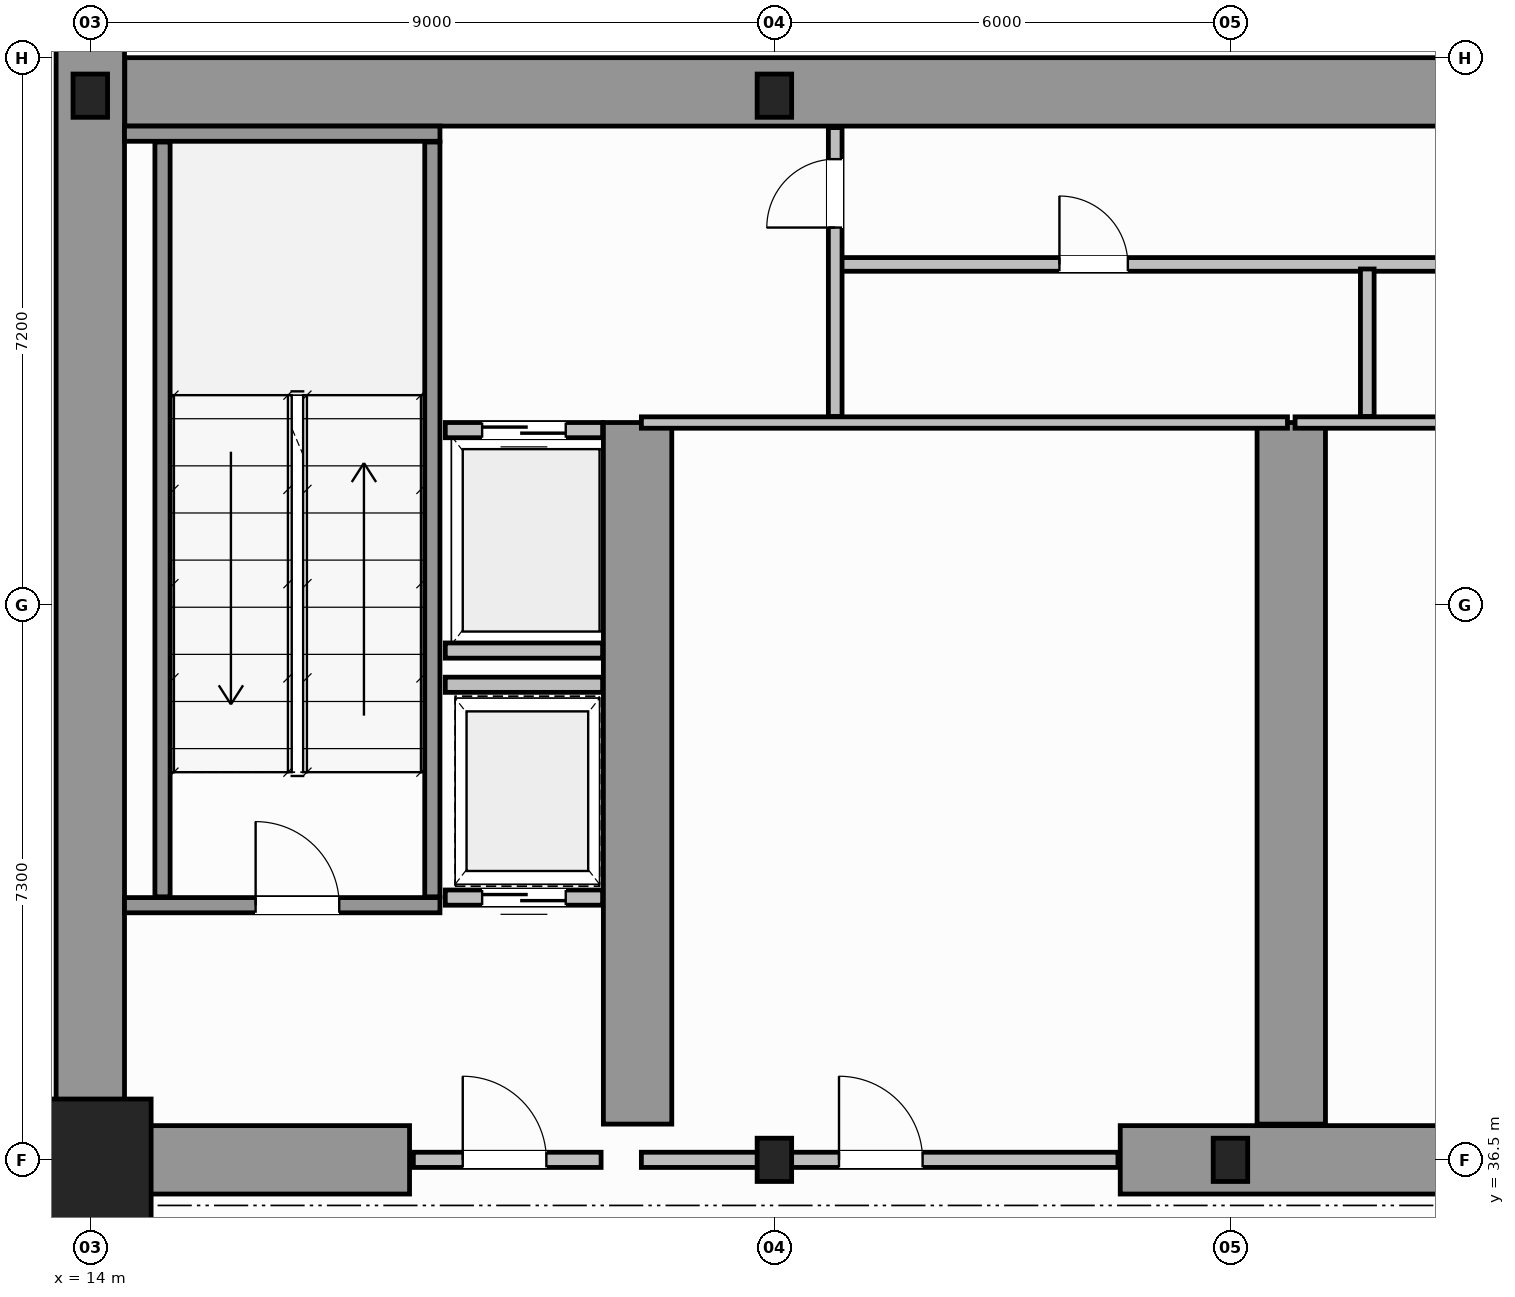
"""IFC4 building model, lengths in metres.
Left out: names, types, materials, properties, quantities, classifications, styles, units other than length and angle.
Written with IfcOpenShell. Run it as: python <this file> out.ifc"""

import sys

from ifc_helpers import new_model, si_unit, direction, frame, frame_2d, origin, origin_2d, place, context, subcontext, project, spatial, rectangle, i_section, extrude, source, transform, mapped, element, fill, save


model = new_model("IFC4")
c1 = context("Model", 3, precision=1e-05, world=origin(), true_north=direction((0.0, 1.0)))
c2 = subcontext(c1, "Body", "Model", "MODEL_VIEW")
j1 = project(units=[si_unit("LENGTHUNIT", "METRE"), si_unit("PLANEANGLEUNIT", "RADIAN")], contexts=[c1])
p1 = place(None, origin())
s1 = spatial("IfcSite", under=j1, at=p1, CompositionType="ELEMENT")
p2 = place(p1, origin())
s2 = spatial("IfcBuilding", under=s1, at=p2, CompositionType="ELEMENT")
p3 = place(p2, frame((0.0, 0.0, -5.2)))
s3 = spatial("IfcBuildingStorey", under=s2, at=p3, CompositionType="ELEMENT", Elevation=-5.2)
m1 = source(origin(), c2, "Body", "SweptSolid", [
    extrude(rectangle(XDim=1.6, YDim=1.6, at=origin_2d()), origin(), (0.0, 0.0, 1.0), 5.2),
])
p4 = place(p3, frame((14.0, 36.5, 0.0), z_axis=(0.0, 0.0, 1.0), x_axis=(1.0, 0.0, 0.0)))
e1 = element("IfcColumn", 1, at=p4, inside=s3, PredefinedType="COLUMN", context=c2, shape_type="MappedRepresentation", body=[
    mapped(m1, transform((0.0, 0.0, 0.0), scale=1.0)),
])
m2 = source(origin(), c2, "Body", "SweptSolid", [
    extrude(i_section(OverallWidth=0.454, OverallDepth=0.569, WebThickness=0.078, FlangeThickness=0.08, FilletRadius=0.015, at=origin_2d()), origin(), (0.0, 0.0, 1.0), 5.2),
])
for number, where, z_axis, x_axis in (
    (2, (23.0, 36.5, 0.0), (0.0, 0.0, 1.0), (1.0, 0.0, 0.0)),
    (3, (29.0, 36.5, 0.0), (0.0, 0.0, 1.0), (1.0, 0.0, 0.0)),
    (4, (14.0, 50.5, 0.0), (0.0, 0.0, 1.0), (1.0, 0.0, 0.0)),
    (5, (23.0, 50.5, 0.0), (0.0, 0.0, 1.0), (1.0, 0.0, 0.0)),
):
    element("IfcColumn", number, at=place(p3, frame(where, z_axis=z_axis, x_axis=x_axis)), inside=s3, PredefinedType="COLUMN", context=c2, shape_type="MappedRepresentation", body=[
        mapped(m2, transform((0.0, 0.0, 0.0), scale=1.0)),
    ])
p5 = place(p3, frame((14.454, 50.55, 0.0), z_axis=(0.0, 0.0, 1.0), x_axis=(1.0, 0.0, 0.0)))
e6 = element("IfcWall", 6, at=p5, inside=s3, PredefinedType="SHEAR", context=c2, shape_type="SweptSolid", body=[
    extrude(rectangle(XDim=19.544, YDim=0.9, at=frame_2d((9.772, 0.0))), origin(), (0.0, 0.0, 1.0), 5.2),
])
p6 = place(p3, frame((14.0, 36.5, 0.0), z_axis=(0.0, 0.0, 1.0), x_axis=(0.0, 1.0, 0.0)))
e7 = element("IfcWall", 7, at=p6, inside=s3, PredefinedType="SHEAR", context=c2, shape_type="SweptSolid", body=[
    extrude(rectangle(XDim=15.0, YDim=0.9, at=frame_2d((7.5, 0.0))), origin(), (0.0, 0.0, 1.0), 5.2),
])
p7 = place(p3, frame((14.47, 36.5, 0.0), z_axis=(0.0, 0.0, 1.0), x_axis=(1.0, 0.0, 0.0)))
e8 = element("IfcWall", 8, at=p7, inside=s3, PredefinedType="SHEAR", context=c2, shape_type="SweptSolid", body=[
    extrude(rectangle(XDim=3.73, YDim=0.9, at=frame_2d((1.865, 0.0))), origin(), (0.0, 0.0, 1.0), 3.68),
])
p8 = place(p3, frame((27.55, 36.5, 0.0), z_axis=(0.0, 0.0, 1.0), x_axis=(1.0, 0.0, 0.0)))
e9 = element("IfcWall", 9, at=p8, inside=s3, PredefinedType="SHEAR", context=c2, shape_type="SweptSolid", body=[
    extrude(rectangle(XDim=4.5, YDim=0.9, at=frame_2d((2.25, 0.0))), origin(), (0.0, 0.0, 1.0), 5.2),
])
for number, where, z_axis, x_axis in (
    (10, (21.2, 36.97, 0.0), (0.0, 0.0, 1.0), (0.0, 1.0, 0.0)),
    (11, (29.8, 36.97, 0.0), (0.0, 0.0, 1.0), (0.0, 1.0, 0.0)),
):
    element("IfcWall", number, at=place(p3, frame(where, z_axis=z_axis, x_axis=x_axis)), inside=s3, PredefinedType="SHEAR", context=c2, shape_type="SweptSolid", body=[
        extrude(rectangle(XDim=9.23, YDim=0.9, at=frame_2d((4.615, 0.0))), origin(), (0.0, 0.0, 1.0), 5.2),
    ])
p9 = place(p3, frame((14.45, 39.85, 0.0), z_axis=(0.0, 0.0, 1.0), x_axis=(1.0, 0.0, 0.0)))
e12 = element("IfcWall", 12, at=p9, inside=s3, PredefinedType="SOLIDWALL", context=c2, shape_type="SweptSolid", body=[
    extrude(rectangle(XDim=4.15, YDim=0.2, at=frame_2d((2.075, 0.0))), origin(), (0.0, 0.0, 1.0), 5.2),
])
p10 = place(p9, frame((1.725, 0.0, 0.0)))
e13 = element("IfcOpeningElement", 13, at=p10, cuts=e12, PredefinedType="OPENING", context=c2, shape_type="SweptSolid", body=[
    extrude(rectangle(XDim=1.1, YDim=2.15, at=frame_2d((0.55, 1.075))), frame((0.0, 0.11, 0.0), z_axis=(0.0, -1.0, 0.0), x_axis=(1.0, 0.0, 0.0)), (0.0, 0.0, 1.0), 0.22),
])
p11 = place(p3, frame((14.45, 50.0, 0.0), z_axis=(0.0, 0.0, 1.0), x_axis=(1.0, 0.0, 0.0)))
e14 = element("IfcWall", 14, at=p11, inside=s3, PredefinedType="SOLIDWALL", context=c2, shape_type="SweptSolid", body=[
    extrude(rectangle(XDim=4.15, YDim=0.2, at=frame_2d((2.075, 0.0))), origin(), (0.0, 0.0, 1.0), 5.2),
])
for number, where, z_axis, x_axis in (
    (15, (14.95, 39.96, 0.0), (0.0, 0.0, 1.0), (0.0, 1.0, 0.0)),
    (16, (18.5, 39.96, 0.0), (0.0, 0.0, 1.0), (0.0, 1.0, 0.0)),
):
    element("IfcWall", number, at=place(p3, frame(where, z_axis=z_axis, x_axis=x_axis)), inside=s3, PredefinedType="SOLIDWALL", context=c2, shape_type="SweptSolid", body=[
        extrude(rectangle(XDim=9.93, YDim=0.2, at=frame_2d((4.965, 0.0))), origin(), (0.0, 0.0, 1.0), 5.2),
    ])
p12 = place(p3, frame((18.25, 36.5, 0.0), z_axis=(0.0, 0.0, 1.0), x_axis=(1.0, 0.0, 0.0)))
e17 = element("IfcWall", 17, at=p12, inside=s3, PredefinedType="SOLIDWALL", context=c2, shape_type="SweptSolid", body=[
    extrude(rectangle(XDim=2.47, YDim=0.2, at=frame_2d((1.235, 0.0))), origin(), (0.0, 0.0, 1.0), 3.67),
])
p13 = place(p12, frame((0.65, 0.0, 0.0)))
e18 = element("IfcOpeningElement", 18, at=p13, cuts=e17, PredefinedType="OPENING", context=c2, shape_type="SweptSolid", body=[
    extrude(rectangle(XDim=1.1, YDim=2.15, at=frame_2d((0.55, 1.075))), frame((0.0, 0.11, 0.0), z_axis=(0.0, -1.0, 0.0), x_axis=(1.0, 0.0, 0.0)), (0.0, 0.0, 1.0), 0.22),
])
p14 = place(p3, frame((18.67, 46.1, 0.0), z_axis=(0.0, 0.0, 1.0), x_axis=(1.0, 0.0, 0.0)))
e19 = element("IfcWall", 19, at=p14, inside=s3, PredefinedType="SOLIDWALL", context=c2, shape_type="SweptSolid", body=[
    extrude(rectangle(XDim=2.07, YDim=0.2, at=frame_2d((1.035, 0.0))), origin(), (0.0, 0.0, 1.0), 4.88),
])
p15 = place(p14, frame((0.485, 0.0, 0.0)))
e20 = element("IfcOpeningElement", 20, at=p15, cuts=e19, PredefinedType="OPENING", context=c2, shape_type="SweptSolid", body=[
    extrude(rectangle(XDim=1.1, YDim=2.15, at=frame_2d((0.55, 1.075))), frame((0.0, 0.11, 0.0), z_axis=(0.0, -1.0, 0.0), x_axis=(1.0, 0.0, 0.0)), (0.0, 0.0, 1.0), 0.22),
])
p16 = place(p3, frame((18.67, 43.2, 0.0), z_axis=(0.0, 0.0, 1.0), x_axis=(1.0, 0.0, 0.0)))
e21 = element("IfcWall", 21, at=p16, inside=s3, PredefinedType="SOLIDWALL", context=c2, shape_type="SweptSolid", body=[
    extrude(rectangle(XDim=2.07, YDim=0.2, at=frame_2d((1.035, 0.0))), origin(), (0.0, 0.0, 1.0), 4.88),
])
p17 = place(p3, frame((18.67, 39.95, 0.0), z_axis=(0.0, 0.0, 1.0), x_axis=(1.0, 0.0, 0.0)))
e22 = element("IfcWall", 22, at=p17, inside=s3, PredefinedType="SOLIDWALL", context=c2, shape_type="SweptSolid", body=[
    extrude(rectangle(XDim=2.07, YDim=0.2, at=frame_2d((1.035, 0.0))), origin(), (0.0, 0.0, 1.0), 4.88),
])
p18 = place(p17, frame((0.485, 0.0, 0.0)))
e23 = element("IfcOpeningElement", 23, at=p18, cuts=e22, PredefinedType="OPENING", context=c2, shape_type="SweptSolid", body=[
    extrude(rectangle(XDim=1.1, YDim=2.15, at=frame_2d((0.55, 1.075))), frame((0.0, 0.11, 0.0), z_axis=(0.0, -1.0, 0.0), x_axis=(1.0, 0.0, 0.0)), (0.0, 0.0, 1.0), 0.22),
])
p19 = place(p3, frame((18.67, 42.75, 0.0), z_axis=(0.0, 0.0, 1.0), x_axis=(1.0, 0.0, 0.0)))
e24 = element("IfcWall", 24, at=p19, inside=s3, PredefinedType="SOLIDWALL", context=c2, shape_type="SweptSolid", body=[
    extrude(rectangle(XDim=2.07, YDim=0.2, at=frame_2d((1.035, 0.0))), origin(), (0.0, 0.0, 1.0), 4.88),
])
p20 = place(p3, frame((21.25, 36.5, 0.0), z_axis=(0.0, 0.0, 1.0), x_axis=(1.0, 0.0, 0.0)))
e25 = element("IfcWall", 25, at=p20, inside=s3, PredefinedType="SOLIDWALL", context=c2, shape_type="SweptSolid", body=[
    extrude(rectangle(XDim=6.27, YDim=0.2, at=frame_2d((3.135, 0.0))), origin(), (0.0, 0.0, 1.0), 3.67),
])
p21 = place(p20, frame((2.6, 0.0, 0.0)))
e26 = element("IfcOpeningElement", 26, at=p21, cuts=e25, PredefinedType="OPENING", context=c2, shape_type="SweptSolid", body=[
    extrude(rectangle(XDim=1.1, YDim=2.15, at=frame_2d((0.55, 1.075))), frame((0.0, 0.11, 0.0), z_axis=(0.0, -1.0, 0.0), x_axis=(1.0, 0.0, 0.0)), (0.0, 0.0, 1.0), 0.22),
])
for number, where, z_axis, x_axis in (
    (27, (21.25, 46.2, 0.0), (0.0, 0.0, 1.0), (1.0, 0.0, 0.0)),
    (28, (29.85, 46.2, 0.0), (0.0, 0.0, 1.0), (1.0, 0.0, 0.0)),
):
    element("IfcWall", number, at=place(p3, frame(where, z_axis=z_axis, x_axis=x_axis)), inside=s3, PredefinedType="PARTITIONING", context=c2, shape_type="SweptSolid", body=[
        extrude(rectangle(XDim=8.5, YDim=0.15, at=frame_2d((4.25, 0.0))), origin(), (0.0, 0.0, 1.0), 4.88),
    ])
p22 = place(p3, frame((23.85, 48.28, 0.0), z_axis=(0.0, 0.0, 1.0), x_axis=(1.0, 0.0, 0.0)))
e29 = element("IfcWall", 29, at=p22, inside=s3, PredefinedType="PLUMBINGWALL", context=c2, shape_type="SweptSolid", body=[
    extrude(rectangle(XDim=15.03, YDim=0.18, at=frame_2d((7.515, 0.0))), origin(), (0.0, 0.0, 1.0), 4.88),
])
p23 = place(p22, frame((2.9, 0.0, 0.0)))
e30 = element("IfcOpeningElement", 30, at=p23, cuts=e29, PredefinedType="OPENING", context=c2, shape_type="SweptSolid", body=[
    extrude(rectangle(XDim=0.9, YDim=2.15, at=frame_2d((0.45, 1.075))), frame((0.0, 0.1, 0.0), z_axis=(0.0, -1.0, 0.0), x_axis=(1.0, 0.0, 0.0)), (0.0, 0.0, 1.0), 0.2),
])
p24 = place(p22, frame((10.4, 0.0, 0.0)))
e31 = element("IfcOpeningElement", 31, at=p24, cuts=e29, PredefinedType="OPENING", context=c2, shape_type="SweptSolid", body=[
    extrude(rectangle(XDim=0.9, YDim=2.15, at=frame_2d((0.45, 1.075))), frame((0.0, 0.1, 0.0), z_axis=(0.0, -1.0, 0.0), x_axis=(1.0, 0.0, 0.0)), (0.0, 0.0, 1.0), 0.2),
])
p25 = place(p3, frame((23.8, 46.28, 0.0), z_axis=(0.0, 0.0, 1.0), x_axis=(0.0, 1.0, 0.0)))
e32 = element("IfcWall", 32, at=p25, inside=s3, PredefinedType="PLUMBINGWALL", context=c2, shape_type="SweptSolid", body=[
    extrude(rectangle(XDim=3.8, YDim=0.18, at=frame_2d((1.9, 0.0))), origin(), (0.0, 0.0, 1.0), 4.88),
])
p26 = place(p25, frame((2.485, 0.0, 0.0)))
e33 = element("IfcOpeningElement", 33, at=p26, cuts=e32, PredefinedType="OPENING", context=c2, shape_type="SweptSolid", body=[
    extrude(rectangle(XDim=0.9, YDim=2.15, at=frame_2d((0.45, 1.075))), frame((0.0, 0.1, 0.0), z_axis=(0.0, -1.0, 0.0), x_axis=(1.0, 0.0, 0.0)), (0.0, 0.0, 1.0), 0.2),
])
p27 = place(p3, frame((30.8, 46.28, 0.0), z_axis=(0.0, 0.0, 1.0), x_axis=(0.0, 1.0, 0.0)))
e34 = element("IfcWall", 34, at=p27, inside=s3, PredefinedType="PLUMBINGWALL", context=c2, shape_type="SweptSolid", body=[
    extrude(rectangle(XDim=1.94, YDim=0.18, at=frame_2d((0.97, 0.0))), origin(), (0.0, 0.0, 1.0), 4.88),
])
m3 = source(origin(), c2, "Body", "SweptSolid", [
    extrude(rectangle(XDim=1.1, YDim=2.15, at=frame_2d((0.55, 1.075))), frame((0.0, 0.025, 0.0), z_axis=(0.0, -1.0, 0.0), x_axis=(1.0, 0.0, 0.0)), (0.0, 0.0, 1.0), 0.05),
])
p28 = place(p10, origin())
e35 = element("IfcDoor", 35, at=p28, inside=s3, OperationType="SINGLE_SWING_LEFT", PredefinedType="DOOR", context=c2, shape_type="MappedRepresentation", body=[
    mapped(m3, transform((0.0, 0.0, 0.0), scale=1.0)),
])
fill(e13, e35)
p29 = place(p13, origin())
e36 = element("IfcDoor", 36, at=p29, inside=s3, OperationType="SINGLE_SWING_RIGHT", PredefinedType="DOOR", context=c2, shape_type="MappedRepresentation", body=[
    mapped(m3, transform((0.0, 0.0, 0.0), scale=1.0)),
])
fill(e18, e36)
p30 = place(p15, origin())
e37 = element("IfcDoor", 37, at=p30, inside=s3, OperationType="DOUBLE_DOOR_SLIDING", PredefinedType="DOOR", context=c2, shape_type="MappedRepresentation", body=[
    mapped(m3, transform((0.0, 0.0, 0.0), scale=1.0)),
])
fill(e20, e37)
p31 = place(p18, origin())
e38 = element("IfcDoor", 38, at=p31, inside=s3, OperationType="DOUBLE_DOOR_SLIDING", PredefinedType="DOOR", context=c2, shape_type="MappedRepresentation", body=[
    mapped(m3, transform((0.0, 0.0, 0.0), scale=1.0)),
])
fill(e23, e38)
p32 = place(p21, origin())
e39 = element("IfcDoor", 39, at=p32, inside=s3, OperationType="SINGLE_SWING_LEFT", PredefinedType="DOOR", context=c2, shape_type="MappedRepresentation", body=[
    mapped(m3, transform((0.0, 0.0, 0.0), scale=1.0)),
])
fill(e26, e39)
m4 = source(origin(), c2, "Body", "SweptSolid", [
    extrude(rectangle(XDim=0.9, YDim=2.15, at=frame_2d((0.45, 1.075))), frame((0.0, 0.025, 0.0), z_axis=(0.0, -1.0, 0.0), x_axis=(1.0, 0.0, 0.0)), (0.0, 0.0, 1.0), 0.05),
])
p33 = place(p26, origin())
e40 = element("IfcDoor", 40, at=p33, inside=s3, OperationType="SINGLE_SWING_LEFT", PredefinedType="DOOR", context=c2, shape_type="MappedRepresentation", body=[
    mapped(m4, transform((0.0, 0.0, 0.0), scale=1.0)),
])
fill(e33, e40)
p34 = place(p23, origin())
e41 = element("IfcDoor", 41, at=p34, inside=s3, OperationType="SINGLE_SWING_RIGHT", PredefinedType="DOOR", context=c2, shape_type="MappedRepresentation", body=[
    mapped(m4, transform((0.0, 0.0, 0.0), scale=1.0)),
])
fill(e30, e41)
save(model, sys.argv[1])
